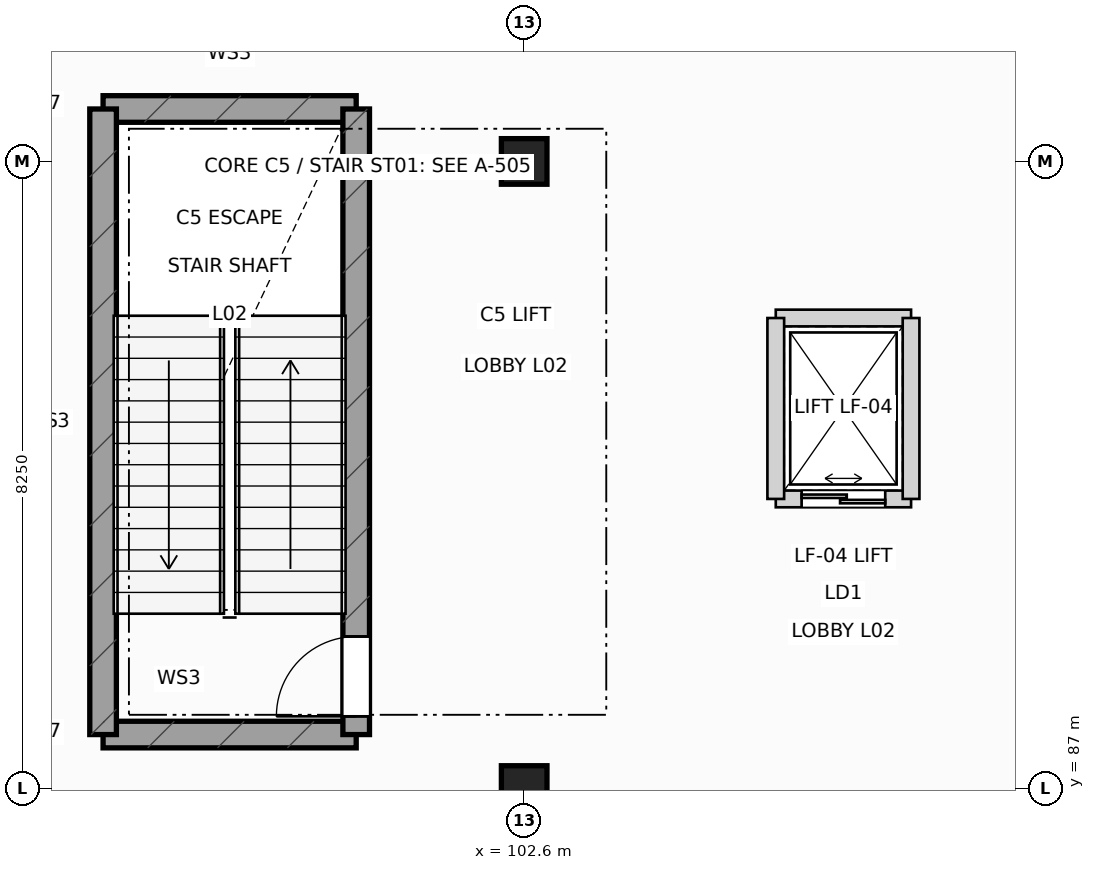
"""IFC4 building model, lengths in metres.
Left out: names, types, materials, properties, quantities, classifications, styles, units other than length and angle.
Written with IfcOpenShell. Run it as: python <this file> out.ifc"""

import sys

from ifc_helpers import new_model, si_unit, direction, frame, frame_2d, origin, origin_2d, place, context, subcontext, project, spatial, rectangle, extrude, element, fill, save


model = new_model("IFC4")
c1 = context("Model", 3, precision=1e-05, world=origin(), true_north=direction((0.0, 1.0)))
c2 = subcontext(c1, "Body", "Model", "MODEL_VIEW")
j1 = project(units=[si_unit("LENGTHUNIT", "METRE"), si_unit("PLANEANGLEUNIT", "RADIAN")], contexts=[c1])
p1 = place(None, origin())
s1 = spatial("IfcSite", under=j1, at=p1, CompositionType="ELEMENT")
p2 = place(p1, origin())
s2 = spatial("IfcBuilding", under=s1, at=p2, CompositionType="ELEMENT")
p3 = place(p2, frame((0.0, 0.0, 11.4)))
s3 = spatial("IfcBuildingStorey", under=s2, at=p3, CompositionType="ELEMENT", Elevation=11.4)
for number, where, z_axis, x_axis in (
    (1, (102.6, 87.0, 0.0), (0.0, 0.0, 1.0), (1.0, 0.0, 0.0)),
    (2, (102.6, 95.25, 0.0), (0.0, 0.0, 1.0), (1.0, 0.0, 0.0)),
):
    element("IfcColumn", number, at=place(p3, frame(where, z_axis=z_axis, x_axis=x_axis)), inside=s3, PredefinedType="COLUMN", context=c2, shape_type="SweptSolid", body=[
        extrude(rectangle(XDim=0.6, YDim=0.6, at=origin_2d()), origin(), (0.0, 0.0, 1.0), 5.4),
    ])
for number, where, z_axis, x_axis in (
    (3, (97.06, 87.71, 0.0), (0.0, 0.0, 1.0), (1.0, 0.0, 0.0)),
    (4, (97.06, 95.94, 0.0), (0.0, 0.0, 1.0), (1.0, 0.0, 0.0)),
):
    element("IfcWall", number, at=place(p3, frame(where, z_axis=z_axis, x_axis=x_axis)), inside=s3, PredefinedType="SHEAR", context=c2, shape_type="SweptSolid", body=[
        extrude(rectangle(XDim=3.33, YDim=0.35, at=frame_2d((1.665, 0.0))), origin(), (0.0, 0.0, 1.0), 5.12),
    ])
p4 = place(p3, frame((97.06, 87.71, 0.0), z_axis=(0.0, 0.0, 1.0), x_axis=(0.0, 1.0, 0.0)))
e5 = element("IfcWall", 5, at=p4, inside=s3, PredefinedType="SHEAR", context=c2, shape_type="SweptSolid", body=[
    extrude(rectangle(XDim=8.23, YDim=0.35, at=frame_2d((4.115, 0.0))), origin(), (0.0, 0.0, 1.0), 5.12),
])
p5 = place(p3, frame((100.39, 87.71, 0.0), z_axis=(0.0, 0.0, 1.0), x_axis=(0.0, 1.0, 0.0)))
e6 = element("IfcWall", 6, at=p5, inside=s3, PredefinedType="SHEAR", context=c2, shape_type="SweptSolid", body=[
    extrude(rectangle(XDim=8.23, YDim=0.35, at=frame_2d((4.115, 0.0))), origin(), (0.0, 0.0, 1.0), 5.12),
])
p6 = place(p5, frame((0.24, 0.0, 0.0)))
e7 = element("IfcOpeningElement", 7, at=p6, cuts=e6, PredefinedType="OPENING", context=c2, shape_type="SweptSolid", body=[
    extrude(rectangle(XDim=1.05, YDim=2.18, at=frame_2d((0.525, 1.09))), frame((0.0, 0.185, 0.0), z_axis=(0.0, -1.0, 0.0), x_axis=(1.0, 0.0, 0.0)), (0.0, 0.0, 1.0), 0.37),
])
p7 = place(p3, frame((105.91, 90.81, 0.0), z_axis=(0.0, 0.0, 1.0), x_axis=(1.0, 0.0, 0.0)))
e8 = element("IfcWall", 8, at=p7, inside=s3, PredefinedType="PARTITIONING", context=c2, shape_type="SweptSolid", body=[
    extrude(rectangle(XDim=1.78, YDim=0.22, at=frame_2d((0.89, 0.0))), origin(), (0.0, 0.0, 1.0), 5.085),
])
p8 = place(p7, frame((0.34, 0.0, 0.0)))
e9 = element("IfcOpeningElement", 9, at=p8, cuts=e8, PredefinedType="OPENING", context=c2, shape_type="SweptSolid", body=[
    extrude(rectangle(XDim=1.1, YDim=2.18, at=frame_2d((0.55, 1.09))), frame((0.0, 0.12, 0.0), z_axis=(0.0, -1.0, 0.0), x_axis=(1.0, 0.0, 0.0)), (0.0, 0.0, 1.0), 0.24),
])
p9 = place(p3, frame((105.91, 93.19, 0.0), z_axis=(0.0, 0.0, 1.0), x_axis=(1.0, 0.0, 0.0)))
e10 = element("IfcWall", 10, at=p9, inside=s3, PredefinedType="PARTITIONING", context=c2, shape_type="SweptSolid", body=[
    extrude(rectangle(XDim=1.78, YDim=0.22, at=frame_2d((0.89, 0.0))), origin(), (0.0, 0.0, 1.0), 5.085),
])
for number, where, z_axis, x_axis in (
    (11, (105.91, 90.81, 0.0), (0.0, 0.0, 1.0), (0.0, 1.0, 0.0)),
    (12, (107.69, 90.81, 0.0), (0.0, 0.0, 1.0), (0.0, 1.0, 0.0)),
):
    element("IfcWall", number, at=place(p3, frame(where, z_axis=z_axis, x_axis=x_axis)), inside=s3, PredefinedType="PARTITIONING", context=c2, shape_type="SweptSolid", body=[
        extrude(rectangle(XDim=2.38, YDim=0.22, at=frame_2d((1.19, 0.0))), origin(), (0.0, 0.0, 1.0), 5.085),
    ])
p10 = place(p6, origin())
e13 = element("IfcDoor", 13, at=p10, inside=s3, OperationType="SINGLE_SWING_LEFT", PredefinedType="DOOR", context=c2, shape_type="SweptSolid", body=[
    extrude(rectangle(XDim=1.05, YDim=2.18, at=frame_2d((0.525, 1.09))), frame((0.0, 0.025, 0.0), z_axis=(0.0, -1.0, 0.0), x_axis=(1.0, 0.0, 0.0)), (0.0, 0.0, 1.0), 0.05),
])
fill(e7, e13)
p11 = place(p8, origin())
e14 = element("IfcDoor", 14, at=p11, inside=s3, OperationType="DOUBLE_DOOR_SLIDING", PredefinedType="DOOR", context=c2, shape_type="SweptSolid", body=[
    extrude(rectangle(XDim=1.1, YDim=2.18, at=frame_2d((0.55, 1.09))), frame((0.0, 0.025, 0.0), z_axis=(0.0, -1.0, 0.0), x_axis=(1.0, 0.0, 0.0)), (0.0, 0.0, 1.0), 0.05),
])
fill(e9, e14)
save(model, sys.argv[1])
